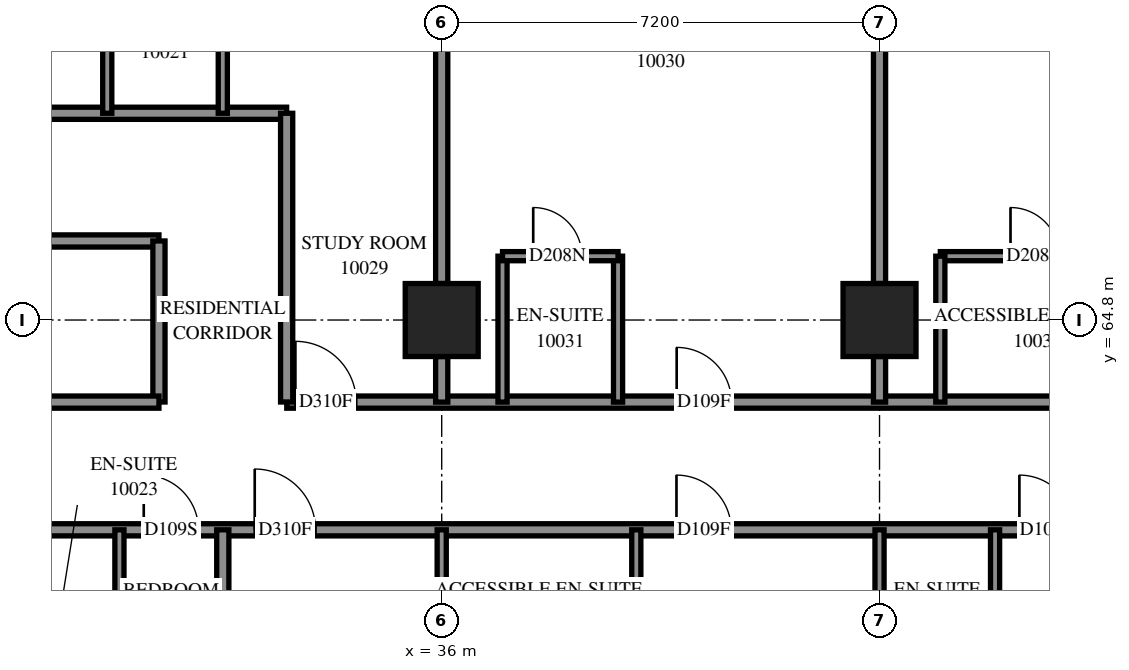
"""IFC4 building model, lengths in metres.
Left out: names, types, materials, properties, quantities, classifications, styles, units other than length and angle.
Written with IfcOpenShell. Run it as: python <this file> out.ifc"""

import sys

from ifc_helpers import new_model, si_unit, direction, frame, frame_2d, origin, origin_2d, place, context, subcontext, project, spatial, rectangle, extrude, element, fill, save


model = new_model("IFC4")
c1 = context("Model", 3, precision=1e-05, world=origin(), true_north=direction((0.0, 1.0)))
c2 = subcontext(c1, "Body", "Model", "MODEL_VIEW")
j1 = project(units=[si_unit("LENGTHUNIT", "METRE"), si_unit("PLANEANGLEUNIT", "RADIAN")], contexts=[c1])
p1 = place(None, origin())
s1 = spatial("IfcSite", under=j1, at=p1, CompositionType="ELEMENT")
p2 = place(p1, origin())
s2 = spatial("IfcBuilding", under=s1, at=p2, CompositionType="ELEMENT")
p3 = place(p2, frame((0.0, 0.0, 40.6)))
s3 = spatial("IfcBuildingStorey", under=s2, at=p3, CompositionType="ELEMENT", Elevation=40.6)
for number, where, z_axis, x_axis in (
    (1, (36.0, 64.8, 0.0), (0.0, 0.0, 1.0), (1.0, 0.0, 0.0)),
    (2, (43.2, 64.8, 0.0), (0.0, 0.0, 1.0), (1.0, 0.0, 0.0)),
):
    element("IfcColumn", number, at=place(p3, frame(where, z_axis=z_axis, x_axis=x_axis)), inside=s3, PredefinedType="COLUMN", context=c2, shape_type="SweptSolid", body=[
        extrude(rectangle(XDim=1.2, YDim=1.2, at=origin_2d()), origin(), (0.0, 0.0, 1.0), 3.1),
    ])
p4 = place(p3, frame((28.8, 61.35, 0.0), z_axis=(0.0, 0.0, 1.0), x_axis=(1.0, 0.0, 0.0)))
e3 = element("IfcWall", 3, at=p4, inside=s3, PredefinedType="PARTITIONING", context=c2, shape_type="SweptSolid", body=[
    extrude(rectangle(XDim=24.15, YDim=0.2, at=frame_2d((12.075, 0.0))), origin(), (0.0, 0.0, 1.0), 3.1),
])
p5 = place(p4, frame((2.3, 0.0, 0.0)))
e4 = element("IfcOpeningElement", 4, at=p5, cuts=e3, PredefinedType="OPENING", context=c2, shape_type="SweptSolid", body=[
    extrude(rectangle(XDim=0.9, YDim=2.1, at=frame_2d((0.45, 1.05))), frame((0.0, 0.11, 0.0), z_axis=(0.0, -1.0, 0.0), x_axis=(1.0, 0.0, 0.0)), (0.0, 0.0, 1.0), 0.22),
])
p6 = place(p4, frame((4.125, 0.0, 0.0)))
e5 = element("IfcOpeningElement", 5, at=p6, cuts=e3, PredefinedType="OPENING", context=c2, shape_type="SweptSolid", body=[
    extrude(rectangle(XDim=1.0, YDim=2.1, at=frame_2d((0.5, 1.05))), frame((0.0, 0.11, 0.0), z_axis=(0.0, -1.0, 0.0), x_axis=(1.0, 0.0, 0.0)), (0.0, 0.0, 1.0), 0.22),
])
p7 = place(p4, frame((11.061, 0.0, 0.0)))
e6 = element("IfcOpeningElement", 6, at=p7, cuts=e3, PredefinedType="OPENING", context=c2, shape_type="SweptSolid", body=[
    extrude(rectangle(XDim=0.9, YDim=2.1, at=frame_2d((0.45, 1.05))), frame((0.0, 0.11, 0.0), z_axis=(0.0, -1.0, 0.0), x_axis=(1.0, 0.0, 0.0)), (0.0, 0.0, 1.0), 0.22),
])
p8 = place(p4, frame((16.7, 0.0, 0.0)))
e7 = element("IfcOpeningElement", 7, at=p8, cuts=e3, PredefinedType="OPENING", context=c2, shape_type="SweptSolid", body=[
    extrude(rectangle(XDim=0.9, YDim=2.1, at=frame_2d((0.45, 1.05))), frame((0.0, 0.11, 0.0), z_axis=(0.0, -1.0, 0.0), x_axis=(1.0, 0.0, 0.0)), (0.0, 0.0, 1.0), 0.22),
])
p9 = place(p4, frame((18.508, 0.0, 0.0)))
e8 = element("IfcOpeningElement", 8, at=p9, cuts=e3, PredefinedType="OPENING", context=c2, shape_type="SweptSolid", body=[
    extrude(rectangle(XDim=1.0, YDim=2.1, at=frame_2d((0.5, 1.05))), frame((0.0, 0.11, 0.0), z_axis=(0.0, -1.0, 0.0), x_axis=(1.0, 0.0, 0.0)), (0.0, 0.0, 1.0), 0.22),
])
p10 = place(p4, frame((22.882, 0.0, 0.0)))
e9 = element("IfcOpeningElement", 9, at=p10, cuts=e3, PredefinedType="OPENING", context=c2, shape_type="SweptSolid", body=[
    extrude(rectangle(XDim=1.0, YDim=2.1, at=frame_2d((0.5, 1.05))), frame((0.0, 0.11, 0.0), z_axis=(0.0, -1.0, 0.0), x_axis=(1.0, 0.0, 0.0)), (0.0, 0.0, 1.0), 0.22),
])
p11 = place(p3, frame((33.452, 63.45, 0.0), z_axis=(0.0, 0.0, 1.0), x_axis=(1.0, 0.0, 0.0)))
e10 = element("IfcWall", 10, at=p11, inside=s3, PredefinedType="PARTITIONING", context=c2, shape_type="SweptSolid", body=[
    extrude(rectangle(XDim=21.648, YDim=0.2, at=frame_2d((10.824, 0.0))), origin(), (0.0, 0.0, 1.0), 3.1),
])
p12 = place(p11, frame((0.142, 0.0, 0.0)))
e11 = element("IfcOpeningElement", 11, at=p12, cuts=e10, PredefinedType="OPENING", context=c2, shape_type="SweptSolid", body=[
    extrude(rectangle(XDim=1.0, YDim=2.1, at=frame_2d((0.5, 1.05))), frame((0.0, 0.11, 0.0), z_axis=(0.0, -1.0, 0.0), x_axis=(1.0, 0.0, 0.0)), (0.0, 0.0, 1.0), 0.22),
])
p13 = place(p11, frame((6.412, 0.0, 0.0)))
e12 = element("IfcOpeningElement", 12, at=p13, cuts=e10, PredefinedType="OPENING", context=c2, shape_type="SweptSolid", body=[
    extrude(rectangle(XDim=0.9, YDim=2.1, at=frame_2d((0.45, 1.05))), frame((0.0, 0.11, 0.0), z_axis=(0.0, -1.0, 0.0), x_axis=(1.0, 0.0, 0.0)), (0.0, 0.0, 1.0), 0.22),
])
p14 = place(p11, frame((14.168, 0.0, 0.0)))
e13 = element("IfcOpeningElement", 13, at=p14, cuts=e10, PredefinedType="OPENING", context=c2, shape_type="SweptSolid", body=[
    extrude(rectangle(XDim=0.9, YDim=2.1, at=frame_2d((0.45, 1.05))), frame((0.0, 0.11, 0.0), z_axis=(0.0, -1.0, 0.0), x_axis=(1.0, 0.0, 0.0)), (0.0, 0.0, 1.0), 0.22),
])
p15 = place(p11, frame((17.651, 0.0, 0.0)))
e14 = element("IfcOpeningElement", 14, at=p15, cuts=e10, PredefinedType="OPENING", context=c2, shape_type="SweptSolid", body=[
    extrude(rectangle(XDim=0.9, YDim=2.1, at=frame_2d((0.45, 1.05))), frame((0.0, 0.11, 0.0), z_axis=(0.0, -1.0, 0.0), x_axis=(1.0, 0.0, 0.0)), (0.0, 0.0, 1.0), 0.22),
])
p16 = place(p3, frame((21.602, 68.2, 0.0), z_axis=(0.0, 0.0, 1.0), x_axis=(1.0, 0.0, 0.0)))
e15 = element("IfcWall", 15, at=p16, inside=s3, PredefinedType="PARTITIONING", context=c2, shape_type="SweptSolid", body=[
    extrude(rectangle(XDim=11.848, YDim=0.2, at=frame_2d((5.924, 0.0))), origin(), (0.0, 0.0, 1.0), 3.1),
])
p17 = place(p16, frame((5.855, 0.0, 0.0)))
e16 = element("IfcOpeningElement", 16, at=p17, cuts=e15, PredefinedType="OPENING", context=c2, shape_type="SweptSolid", body=[
    extrude(rectangle(XDim=0.9, YDim=2.1, at=frame_2d((0.45, 1.05))), frame((0.0, 0.11, 0.0), z_axis=(0.0, -1.0, 0.0), x_axis=(1.0, 0.0, 0.0)), (0.0, 0.0, 1.0), 0.22),
])
p18 = place(p3, frame((21.602, 66.1, 0.0), z_axis=(0.0, 0.0, 1.0), x_axis=(1.0, 0.0, 0.0)))
e17 = element("IfcWall", 17, at=p18, inside=s3, PredefinedType="PARTITIONING", context=c2, shape_type="SweptSolid", body=[
    extrude(rectangle(XDim=9.748, YDim=0.2, at=frame_2d((4.874, 0.0))), origin(), (0.0, 0.0, 1.0), 3.1),
])
p19 = place(p18, frame((1.791, 0.0, 0.0)))
e18 = element("IfcOpeningElement", 18, at=p19, cuts=e17, PredefinedType="OPENING", context=c2, shape_type="SweptSolid", body=[
    extrude(rectangle(XDim=1.0, YDim=2.1, at=frame_2d((0.5, 1.05))), frame((0.0, 0.11, 0.0), z_axis=(0.0, -1.0, 0.0), x_axis=(1.0, 0.0, 0.0)), (0.0, 0.0, 1.0), 0.22),
])
p20 = place(p18, frame((5.3, 0.0, 0.0)))
e19 = element("IfcOpeningElement", 19, at=p20, cuts=e17, PredefinedType="OPENING", context=c2, shape_type="SweptSolid", body=[
    extrude(rectangle(XDim=1.0, YDim=2.1, at=frame_2d((0.5, 1.05))), frame((0.0, 0.11, 0.0), z_axis=(0.0, -1.0, 0.0), x_axis=(1.0, 0.0, 0.0)), (0.0, 0.0, 1.0), 0.22),
])
for number, where, z_axis, x_axis in (
    (20, (36.0, 65.4, 0.0), (0.0, 0.0, 1.0), (0.0, 1.0, 0.0)),
    (21, (43.2, 65.4, 0.0), (0.0, 0.0, 1.0), (0.0, 1.0, 0.0)),
):
    element("IfcWall", number, at=place(p3, frame(where, z_axis=z_axis, x_axis=x_axis)), inside=s3, PredefinedType="PARTITIONING", context=c2, shape_type="SweptSolid", body=[
        extrude(rectangle(XDim=6.0, YDim=0.2, at=frame_2d((3.0, 0.0))), origin(), (0.0, 0.0, 1.0), 3.1),
    ])
p21 = place(p3, frame((33.45, 63.452, 0.0), z_axis=(0.0, 0.0, 1.0), x_axis=(0.0, 1.0, 0.0)))
e22 = element("IfcWall", 22, at=p21, inside=s3, PredefinedType="PARTITIONING", context=c2, shape_type="SweptSolid", body=[
    extrude(rectangle(XDim=4.748, YDim=0.2, at=frame_2d((2.374, 0.0))), origin(), (0.0, 0.0, 1.0), 3.1),
])
p22 = place(p3, frame((32.4, 56.95, 0.0), z_axis=(0.0, 0.0, 1.0), x_axis=(0.0, 1.0, 0.0)))
e23 = element("IfcWall", 23, at=p22, inside=s3, PredefinedType="PARTITIONING", context=c2, shape_type="SweptSolid", body=[
    extrude(rectangle(XDim=4.4, YDim=0.2, at=frame_2d((2.2, 0.0))), origin(), (0.0, 0.0, 1.0), 3.1),
])
p23 = place(p3, frame((44.2, 65.85, 0.0), z_axis=(0.0, 0.0, 1.0), x_axis=(1.0, 0.0, 0.0)))
e24 = element("IfcWall", 24, at=p23, inside=s3, PredefinedType="PARTITIONING", context=c2, shape_type="SweptSolid", body=[
    extrude(rectangle(XDim=3.2, YDim=0.15, at=frame_2d((1.6, 0.0))), origin(), (0.0, 0.0, 1.0), 3.1),
])
p24 = place(p23, frame((1.154, 0.0, 0.0)))
e25 = element("IfcOpeningElement", 25, at=p24, cuts=e24, PredefinedType="OPENING", context=c2, shape_type="SweptSolid", body=[
    extrude(rectangle(XDim=0.8, YDim=2.1, at=frame_2d((0.4, 1.05))), frame((0.0, 0.085, 0.0), z_axis=(0.0, -1.0, 0.0), x_axis=(1.0, 0.0, 0.0)), (0.0, 0.0, 1.0), 0.17),
])
p25 = place(p3, frame((31.35, 63.452, 0.0), z_axis=(0.0, 0.0, 1.0), x_axis=(0.0, 1.0, 0.0)))
e26 = element("IfcWall", 26, at=p25, inside=s3, PredefinedType="PARTITIONING", context=c2, shape_type="SweptSolid", body=[
    extrude(rectangle(XDim=2.648, YDim=0.2, at=frame_2d((1.324, 0.0))), origin(), (0.0, 0.0, 1.0), 3.1),
])
p26 = place(p3, frame((28.802, 63.45, 0.0), z_axis=(0.0, 0.0, 1.0), x_axis=(1.0, 0.0, 0.0)))
e27 = element("IfcWall", 27, at=p26, inside=s3, PredefinedType="PARTITIONING", context=c2, shape_type="SweptSolid", body=[
    extrude(rectangle(XDim=2.548, YDim=0.2, at=frame_2d((1.274, 0.0))), origin(), (0.0, 0.0, 1.0), 3.1),
])
for number, where, z_axis, x_axis in (
    (28, (30.7, 58.95, 0.0), (0.0, 0.0, 1.0), (0.0, 1.0, 0.0)),
    (29, (39.2, 58.95, 0.0), (0.0, 0.0, 1.0), (0.0, 1.0, 0.0)),
    (30, (36.0, 58.95, 0.0), (0.0, 0.0, 1.0), (0.0, 1.0, 0.0)),
    (31, (45.1, 58.95, 0.0), (0.0, 0.0, 1.0), (0.0, 1.0, 0.0)),
    (32, (43.2, 58.95, 0.0), (0.0, 0.0, 1.0), (0.0, 1.0, 0.0)),
    (33, (30.5, 68.2, 0.0), (0.0, 0.0, 1.0), (0.0, 1.0, 0.0)),
    (34, (32.4, 68.2, 0.0), (0.0, 0.0, 1.0), (0.0, 1.0, 0.0)),
    (35, (37.0, 63.45, 0.0), (0.0, 0.0, 1.0), (0.0, 1.0, 0.0)),
    (36, (38.9, 63.45, 0.0), (0.0, 0.0, 1.0), (0.0, 1.0, 0.0)),
    (37, (44.2, 63.45, 0.0), (0.0, 0.0, 1.0), (0.0, 1.0, 0.0)),
):
    element("IfcWall", number, at=place(p3, frame(where, z_axis=z_axis, x_axis=x_axis)), inside=s3, PredefinedType="PARTITIONING", context=c2, shape_type="SweptSolid", body=[
        extrude(rectangle(XDim=2.4, YDim=0.15, at=frame_2d((1.2, 0.0))), origin(), (0.0, 0.0, 1.0), 3.1),
    ])
p27 = place(p3, frame((37.0, 65.85, 0.0), z_axis=(0.0, 0.0, 1.0), x_axis=(1.0, 0.0, 0.0)))
e38 = element("IfcWall", 38, at=p27, inside=s3, PredefinedType="PARTITIONING", context=c2, shape_type="SweptSolid", body=[
    extrude(rectangle(XDim=1.9, YDim=0.15, at=frame_2d((0.95, 0.0))), origin(), (0.0, 0.0, 1.0), 3.1),
])
p28 = place(p27, frame((0.505, 0.0, 0.0)))
e39 = element("IfcOpeningElement", 39, at=p28, cuts=e38, PredefinedType="OPENING", context=c2, shape_type="SweptSolid", body=[
    extrude(rectangle(XDim=0.8, YDim=2.1, at=frame_2d((0.4, 1.05))), frame((0.0, 0.085, 0.0), z_axis=(0.0, -1.0, 0.0), x_axis=(1.0, 0.0, 0.0)), (0.0, 0.0, 1.0), 0.17),
])
for number, where, z_axis, x_axis in (
    (40, (36.0, 63.45, 0.0), (0.0, 0.0, 1.0), (0.0, 1.0, 0.0)),
    (41, (43.2, 63.45, 0.0), (0.0, 0.0, 1.0), (0.0, 1.0, 0.0)),
):
    element("IfcWall", number, at=place(p3, frame(where, z_axis=z_axis, x_axis=x_axis)), inside=s3, PredefinedType="PARTITIONING", context=c2, shape_type="SweptSolid", body=[
        extrude(rectangle(XDim=0.75, YDim=0.2, at=frame_2d((0.375, 0.0))), origin(), (0.0, 0.0, 1.0), 3.1),
    ])
p29 = place(p5, origin())
e42 = element("IfcDoor", 42, at=p29, inside=s3, OperationType="SINGLE_SWING_LEFT", PredefinedType="DOOR", context=c2, shape_type="SweptSolid", body=[
    extrude(rectangle(XDim=0.9, YDim=2.1, at=frame_2d((0.45, 1.05))), frame((0.0, 0.025, 0.0), z_axis=(0.0, -1.0, 0.0), x_axis=(1.0, 0.0, 0.0)), (0.0, 0.0, 1.0), 0.05),
])
fill(e4, e42)
p30 = place(p6, origin())
e43 = element("IfcDoor", 43, at=p30, inside=s3, OperationType="SINGLE_SWING_RIGHT", PredefinedType="DOOR", context=c2, shape_type="SweptSolid", body=[
    extrude(rectangle(XDim=1.0, YDim=2.1, at=frame_2d((0.5, 1.05))), frame((0.0, 0.025, 0.0), z_axis=(0.0, -1.0, 0.0), x_axis=(1.0, 0.0, 0.0)), (0.0, 0.0, 1.0), 0.05),
])
fill(e5, e43)
p31 = place(p7, origin())
e44 = element("IfcDoor", 44, at=p31, inside=s3, OperationType="SINGLE_SWING_LEFT", PredefinedType="DOOR", context=c2, shape_type="SweptSolid", body=[
    extrude(rectangle(XDim=0.9, YDim=2.1, at=frame_2d((0.45, 1.05))), frame((0.0, 0.025, 0.0), z_axis=(0.0, -1.0, 0.0), x_axis=(1.0, 0.0, 0.0)), (0.0, 0.0, 1.0), 0.05),
])
fill(e6, e44)
p32 = place(p8, origin())
e45 = element("IfcDoor", 45, at=p32, inside=s3, OperationType="SINGLE_SWING_LEFT", PredefinedType="DOOR", context=c2, shape_type="SweptSolid", body=[
    extrude(rectangle(XDim=0.9, YDim=2.1, at=frame_2d((0.45, 1.05))), frame((0.0, 0.025, 0.0), z_axis=(0.0, -1.0, 0.0), x_axis=(1.0, 0.0, 0.0)), (0.0, 0.0, 1.0), 0.05),
])
fill(e7, e45)
p33 = place(p12, origin())
e46 = element("IfcDoor", 46, at=p33, inside=s3, OperationType="SINGLE_SWING_LEFT", PredefinedType="DOOR", context=c2, shape_type="SweptSolid", body=[
    extrude(rectangle(XDim=1.0, YDim=2.1, at=frame_2d((0.5, 1.05))), frame((0.0, 0.025, 0.0), z_axis=(0.0, -1.0, 0.0), x_axis=(1.0, 0.0, 0.0)), (0.0, 0.0, 1.0), 0.05),
])
fill(e11, e46)
p34 = place(p13, origin())
e47 = element("IfcDoor", 47, at=p34, inside=s3, OperationType="SINGLE_SWING_RIGHT", PredefinedType="DOOR", context=c2, shape_type="SweptSolid", body=[
    extrude(rectangle(XDim=0.9, YDim=2.1, at=frame_2d((0.45, 1.05))), frame((0.0, 0.025, 0.0), z_axis=(0.0, -1.0, 0.0), x_axis=(1.0, 0.0, 0.0)), (0.0, 0.0, 1.0), 0.05),
])
fill(e12, e47)
p35 = place(p28, origin())
e48 = element("IfcDoor", 48, at=p35, inside=s3, OperationType="SINGLE_SWING_RIGHT", PredefinedType="DOOR", context=c2, shape_type="SweptSolid", body=[
    extrude(rectangle(XDim=0.8, YDim=2.1, at=frame_2d((0.4, 1.05))), frame((0.0, 0.025, 0.0), z_axis=(0.0, -1.0, 0.0), x_axis=(1.0, 0.0, 0.0)), (0.0, 0.0, 1.0), 0.05),
])
fill(e39, e48)
p36 = place(p24, origin())
e49 = element("IfcDoor", 49, at=p36, inside=s3, OperationType="SINGLE_SWING_RIGHT", PredefinedType="DOOR", context=c2, shape_type="SweptSolid", body=[
    extrude(rectangle(XDim=0.8, YDim=2.1, at=frame_2d((0.4, 1.05))), frame((0.0, 0.025, 0.0), z_axis=(0.0, -1.0, 0.0), x_axis=(1.0, 0.0, 0.0)), (0.0, 0.0, 1.0), 0.05),
])
fill(e25, e49)
save(model, sys.argv[1])
